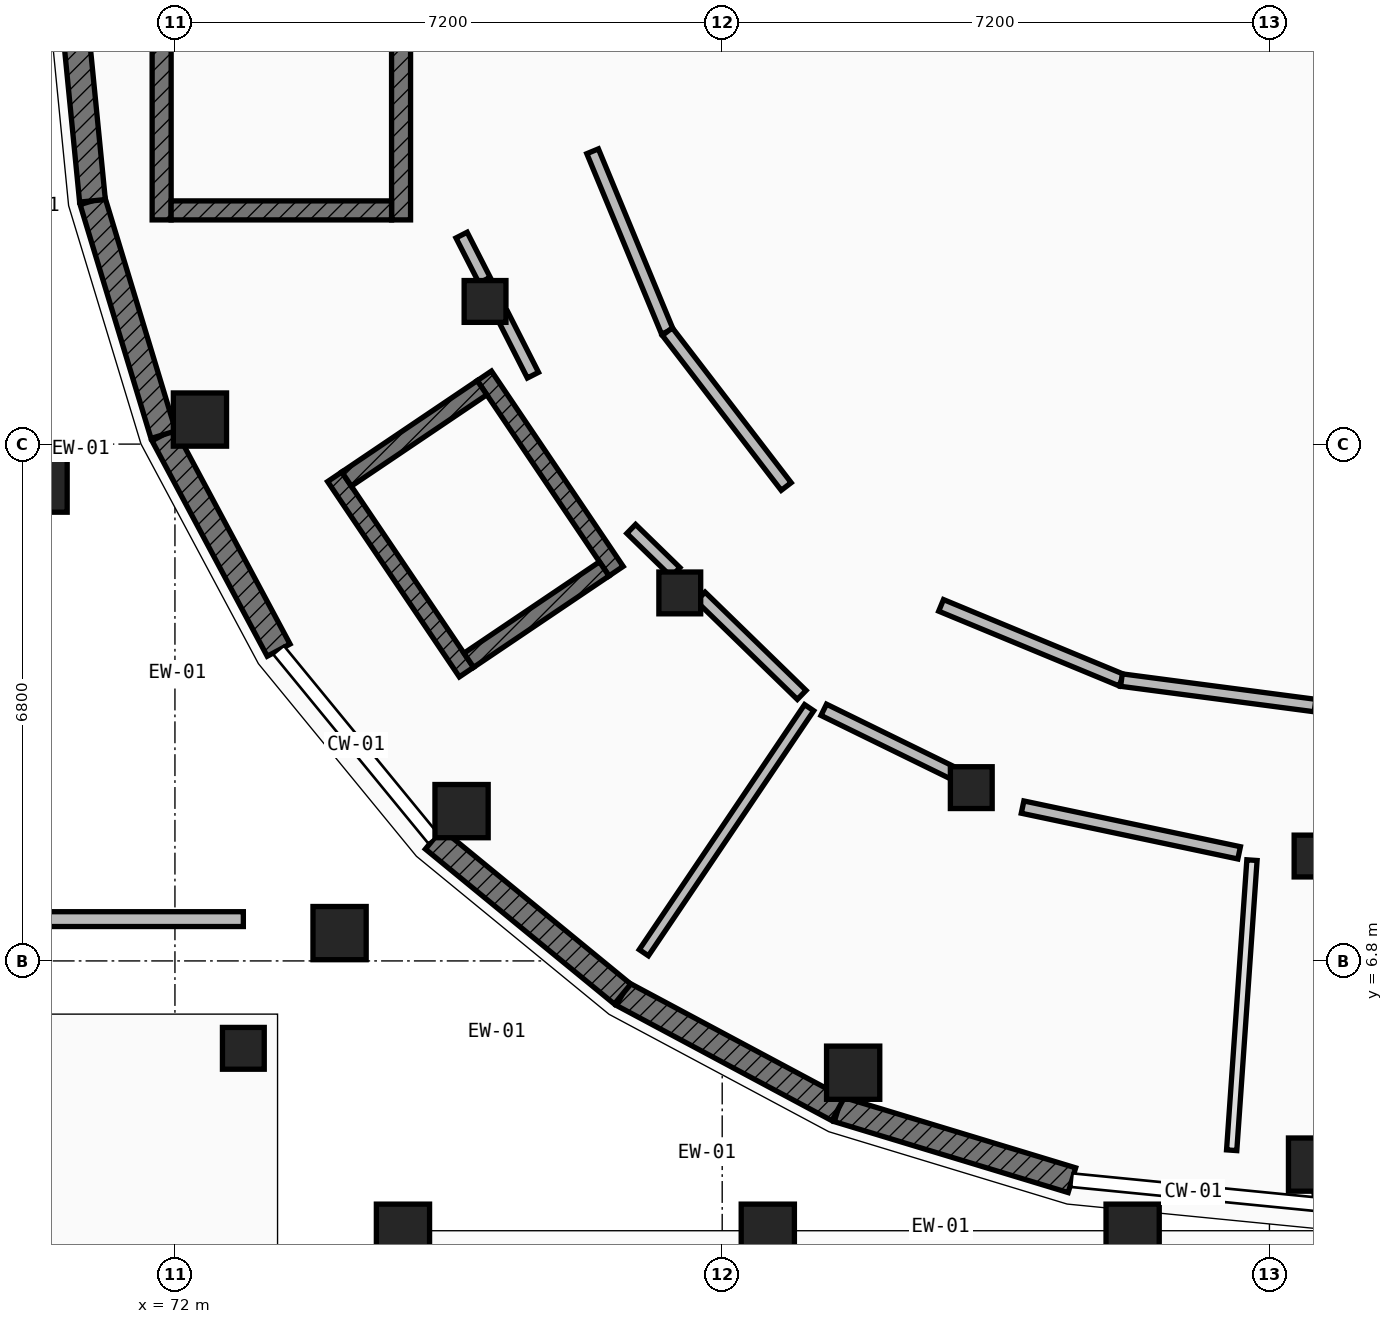
"""IFC4 building model, lengths in metres.
Left out: names, types, materials, properties, quantities, classifications, styles, units other than length and angle.
Written with IfcOpenShell. Run it as: python <this file> out.ifc"""

import sys

from ifc_helpers import new_model, si_unit, direction, frame, frame_2d, origin, origin_2d, place, context, subcontext, project, spatial, rectangle, circle, extrude, element, fill, save


model = new_model("IFC4")
c1 = context("Model", 3, precision=1e-05, world=origin(), true_north=direction((0.0, 1.0)))
c2 = subcontext(c1, "Body", "Model", "MODEL_VIEW")
j1 = project(units=[si_unit("LENGTHUNIT", "METRE"), si_unit("PLANEANGLEUNIT", "RADIAN")], contexts=[c1])
p1 = place(None, origin())
s1 = spatial("IfcSite", under=j1, at=p1, CompositionType="ELEMENT")
p2 = place(p1, origin())
s2 = spatial("IfcBuilding", under=s1, at=p2, CompositionType="ELEMENT")
p3 = place(p2, origin())
s3 = spatial("IfcBuildingStorey", under=s2, at=p3, CompositionType="ELEMENT", Elevation=0.0)
for number, where, z_axis, x_axis in (
    (1, (72.329, 13.923, 0.0), (0.0, 0.0, 1.0), (1.0, 0.0, 0.0)),
    (2, (75.771, 8.771, 0.0), (0.0, 0.0, 1.0), (1.0, 0.0, 0.0)),
    (3, (80.923, 5.329, 0.0), (0.0, 0.0, 1.0), (1.0, 0.0, 0.0)),
    (4, (87.0, 4.12, 0.0), (0.0, 0.0, 1.0), (1.0, 0.0, 0.0)),
):
    element("IfcColumn", number, at=place(p3, frame(where, z_axis=z_axis, x_axis=x_axis)), inside=s3, PredefinedType="COLUMN", context=c2, shape_type="SweptSolid", body=[
        extrude(circle(Radius=0.35, at=origin_2d()), origin(), (0.0, 0.0, 1.0), 4.55),
    ])
for number, where, z_axis, x_axis in (
    (5, (76.08, 15.477, 0.0), (0.0, 0.0, 1.0), (1.0, 0.0, 0.0)),
    (6, (78.642, 11.642, 0.0), (0.0, 0.0, 1.0), (1.0, 0.0, 0.0)),
    (7, (82.477, 9.08, 0.0), (0.0, 0.0, 1.0), (1.0, 0.0, 0.0)),
    (8, (87.0, 8.18, 0.0), (0.0, 0.0, 1.0), (1.0, 0.0, 0.0)),
):
    element("IfcColumn", number, at=place(p3, frame(where, z_axis=z_axis, x_axis=x_axis)), inside=s3, PredefinedType="COLUMN", context=c2, shape_type="SweptSolid", body=[
        extrude(rectangle(XDim=0.55, YDim=0.55, at=origin_2d()), origin(), (0.0, 0.0, 1.0), 4.55),
    ])
for number, where, z_axis, x_axis in (
    (9, (75.0, 3.25, 0.0), (0.0, 0.0, 1.0), (1.0, 0.0, 0.0)),
    (10, (79.8, 3.25, 0.0), (0.0, 0.0, 1.0), (1.0, 0.0, 0.0)),
    (11, (84.6, 3.25, 0.0), (0.0, 0.0, 1.0), (1.0, 0.0, 0.0)),
):
    element("IfcColumn", number, at=place(p3, frame(where, z_axis=z_axis, x_axis=x_axis)), inside=s3, PredefinedType="COLUMN", context=c2, shape_type="SweptSolid", body=[
        extrude(circle(Radius=0.35, at=origin_2d()), origin(), (0.0, 0.0, 1.0), 4.55),
    ])
p4 = place(p3, frame((72.9, 5.65, 0.0), z_axis=(0.0, 0.0, 1.0), x_axis=(1.0, 0.0, 0.0)))
e12 = element("IfcColumn", 12, at=p4, inside=s3, PredefinedType="PILASTER", context=c2, shape_type="SweptSolid", body=[
    extrude(circle(Radius=0.275, at=origin_2d()), origin(), (0.0, 0.0, 1.0), 4.55),
])
for number, where, z_axis, x_axis in (
    (13, (70.232, 13.054, 0.0), (0.0, 0.0, 1.0), (1.0, 0.0, 0.0)),
    (14, (74.166, 7.166, 0.0), (0.0, 0.0, 1.0), (1.0, 0.0, 0.0)),
):
    element("IfcColumn", number, at=place(p3, frame(where, z_axis=z_axis, x_axis=x_axis)), inside=s3, PredefinedType="COLUMN", context=c2, shape_type="SweptSolid", body=[
        extrude(circle(Radius=0.35, at=origin_2d()), origin(), (0.0, 0.0, 1.0), 4.55),
    ])
p5 = place(p3, frame((83.801, 3.915, 0.0), z_axis=(0.0, 0.0, 1.0), x_axis=(-0.956984161567, 0.29014016356, 0.0)))
e15 = element("IfcWall", 15, at=p5, inside=s3, PredefinedType="SOLIDWALL", context=c2, shape_type="SweptSolid", body=[
    extrude(rectangle(XDim=3.215, YDim=0.34, at=frame_2d((1.607, 0.0))), origin(), (0.0, 0.0, 1.0), 3.659),
])
p6 = place(p5, frame((0.708, 0.0, 0.0)))
e16 = element("IfcOpeningElement", 16, at=p6, cuts=e15, PredefinedType="OPENING", context=c2, shape_type="SweptSolid", body=[
    extrude(rectangle(XDim=1.8, YDim=2.55, at=frame_2d((0.9, 1.275))), frame((0.0, 0.18, 0.0), z_axis=(0.0, -1.0, 0.0), x_axis=(1.0, 0.0, 0.0)), (0.0, 0.0, 1.0), 0.36),
])
for number, where, z_axis, x_axis in (
    (17, (80.724, 4.848, 0.0), (0.0, 0.0, 1.0), (-0.882, 0.472, 0.0)),
    (18, (77.889, 6.364, 0.0), (0.0, 0.0, 1.0), (-0.773, 0.634, 0.0)),
    (19, (73.364, 10.889, 0.0), (0.0, 0.0, 1.0), (-0.472, 0.882, 0.0)),
    (20, (71.848, 13.724, 0.0), (0.0, 0.0, 1.0), (-0.29, 0.957, 0.0)),
):
    element("IfcWall", number, at=place(p3, frame(where, z_axis=z_axis, x_axis=x_axis)), inside=s3, PredefinedType="SOLIDWALL", context=c2, shape_type="SweptSolid", body=[
        extrude(rectangle(XDim=3.215, YDim=0.34, at=frame_2d((1.607, 0.0))), origin(), (0.0, 0.0, 1.0), 3.659),
    ])
p7 = place(p3, frame((70.915, 16.801, 0.0), z_axis=(0.0, 0.0, 1.0), x_axis=(-0.097977057849, 0.995188673637, 0.0)))
e21 = element("IfcWall", 21, at=p7, inside=s3, PredefinedType="SOLIDWALL", context=c2, shape_type="SweptSolid", body=[
    extrude(rectangle(XDim=3.214, YDim=0.34, at=frame_2d((1.607, 0.0))), origin(), (0.0, 0.0, 1.0), 3.659),
])
p8 = place(p3, frame((72.9, 7.35, 0.0), z_axis=(0.0, 0.0, 1.0), x_axis=(-1.0, 0.0, 0.0)))
e22 = element("IfcWall", 22, at=p8, inside=s3, PredefinedType="PARAPET", context=c2, shape_type="SweptSolid", body=[
    extrude(rectangle(XDim=14.398, YDim=0.195, at=frame_2d((7.199, 0.0))), origin(), (0.0, 0.0, 1.0), 2.42),
])
p9 = place(p8, frame((6.424, 0.0, 0.0)))
e23 = element("IfcOpeningElement", 23, at=p9, cuts=e22, PredefinedType="OPENING", context=c2, shape_type="SweptSolid", body=[
    extrude(rectangle(XDim=1.55, YDim=2.1, at=frame_2d((0.775, 1.05))), frame((0.0, 0.107, 0.0), z_axis=(0.0, -1.0, 0.0), x_axis=(1.0, 0.0, 0.0)), (0.0, 0.0, 1.0), 0.215),
])
p10 = place(p3, frame((74.975, 16.55, 0.0), z_axis=(0.0, 0.0, 1.0), x_axis=(0.0, 1.0, 0.0)))
e24 = element("IfcWall", 24, at=p10, inside=s3, PredefinedType="SHEAR", context=c2, shape_type="SweptSolid", body=[
    extrude(rectangle(XDim=6.9, YDim=0.25, at=frame_2d((3.45, 0.0))), origin(), (0.0, 0.0, 1.0), 4.305),
])
p11 = place(p10, frame((0.43, 0.0, 0.0)))
e25 = element("IfcOpeningElement", 25, at=p11, cuts=e24, PredefinedType="OPENING", context=c2, shape_type="SweptSolid", body=[
    extrude(rectangle(XDim=1.1, YDim=2.15, at=frame_2d((0.55, 1.075))), frame((0.0, 0.135, 0.0), z_axis=(0.0, -1.0, 0.0), x_axis=(1.0, 0.0, 0.0)), (0.0, 0.0, 1.0), 0.27),
])
p12 = place(p3, frame((71.825, 16.55, 0.0), z_axis=(0.0, 0.0, 1.0), x_axis=(0.0, 1.0, 0.0)))
e26 = element("IfcWall", 26, at=p12, inside=s3, PredefinedType="SHEAR", context=c2, shape_type="SweptSolid", body=[
    extrude(rectangle(XDim=6.9, YDim=0.25, at=frame_2d((3.45, 0.0))), origin(), (0.0, 0.0, 1.0), 4.305),
])
p13 = place(p3, frame((74.85, 16.675, 0.0), z_axis=(0.0, 0.0, 1.0), x_axis=(-1.0, 0.0, 0.0)))
e27 = element("IfcWall", 27, at=p13, inside=s3, PredefinedType="SHEAR", context=c2, shape_type="SweptSolid", body=[
    extrude(rectangle(XDim=2.9, YDim=0.25, at=frame_2d((1.45, 0.0))), origin(), (0.0, 0.0, 1.0), 4.305),
])
p14 = place(p3, frame((77.804, 11.928, 0.0), z_axis=(0.0, 0.0, 1.0), x_axis=(-0.559054792443, 0.829130712883, 0.0)))
e28 = element("IfcWall", 28, at=p14, inside=s3, PredefinedType="SHEAR", context=c2, shape_type="SweptSolid", body=[
    extrude(rectangle(XDim=3.1, YDim=0.225, at=frame_2d((1.55, 0.0))), origin(), (0.0, 0.0, 1.0), 4.305),
])
p15 = place(p14, frame((0.9, 0.0, 0.0)))
e29 = element("IfcOpeningElement", 29, at=p15, cuts=e28, PredefinedType="OPENING", context=c2, shape_type="SweptSolid", body=[
    extrude(rectangle(XDim=1.3, YDim=2.2, at=frame_2d((0.65, 1.1))), frame((0.0, 0.123, 0.0), z_axis=(0.0, -1.0, 0.0), x_axis=(1.0, 0.0, 0.0)), (0.0, 0.0, 1.0), 0.245),
])
p16 = place(p3, frame((75.835, 10.6, 0.0), z_axis=(0.0, 0.0, 1.0), x_axis=(-0.559091302934, 0.829106093925, 0.0)))
e30 = element("IfcWall", 30, at=p16, inside=s3, PredefinedType="SHEAR", context=c2, shape_type="SweptSolid", body=[
    extrude(rectangle(XDim=3.1, YDim=0.225, at=frame_2d((1.55, 0.0))), origin(), (0.0, 0.0, 1.0), 4.305),
])
p17 = place(p3, frame((77.648, 11.958, 0.0), z_axis=(0.0, 0.0, 1.0), x_axis=(-0.829050086962, -0.559174349652, 0.0)))
e31 = element("IfcWall", 31, at=p17, inside=s3, PredefinedType="SHEAR", context=c2, shape_type="SweptSolid", body=[
    extrude(rectangle(XDim=2.149, YDim=0.225, at=frame_2d((1.075, 0.0))), origin(), (0.0, 0.0, 1.0), 4.305),
])
p18 = place(p3, frame((76.04, 14.342, 0.0), z_axis=(0.0, 0.0, 1.0), x_axis=(-0.828997430928, -0.559252411274, 0.0)))
e32 = element("IfcWall", 32, at=p18, inside=s3, PredefinedType="SHEAR", context=c2, shape_type="SweptSolid", body=[
    extrude(rectangle(XDim=2.15, YDim=0.225, at=frame_2d((1.075, 0.0))), origin(), (0.0, 0.0, 1.0), 4.305),
])
p19 = place(p3, frame((77.495, 17.453, 0.0), z_axis=(0.0, 0.0, 1.0), x_axis=(0.382704397106, -0.923870848353, 0.0)))
e33 = element("IfcWall", 33, at=p19, inside=s3, PredefinedType="PARTITIONING", context=c2, shape_type="SweptSolid", body=[
    extrude(rectangle(XDim=2.568, YDim=0.165, at=frame_2d((1.284, 0.0))), origin(), (0.0, 0.0, 1.0), 3.634),
])
p20 = place(p19, frame((0.459, 0.0, 0.0)))
e34 = element("IfcOpeningElement", 34, at=p20, cuts=e33, PredefinedType="OPENING", context=c2, shape_type="SweptSolid", body=[
    extrude(rectangle(XDim=1.65, YDim=2.4, at=frame_2d((0.825, 1.2))), frame((0.0, 0.093, 0.0), z_axis=(0.0, -1.0, 0.0), x_axis=(1.0, 0.0, 0.0)), (0.0, 0.0, 1.0), 0.185),
])
p21 = place(p3, frame((78.478, 15.08, 0.0), z_axis=(0.0, 0.0, 1.0), x_axis=(0.608782621434, -0.793337078322, 0.0)))
e35 = element("IfcWall", 35, at=p21, inside=s3, PredefinedType="PARTITIONING", context=c2, shape_type="SweptSolid", body=[
    extrude(rectangle(XDim=2.569, YDim=0.165, at=frame_2d((1.285, 0.0))), origin(), (0.0, 0.0, 1.0), 3.634),
])
p22 = place(p3, frame((82.08, 11.478, 0.0), z_axis=(0.0, 0.0, 1.0), x_axis=(0.923870848353, -0.382704397106, 0.0)))
e36 = element("IfcWall", 36, at=p22, inside=s3, PredefinedType="PARTITIONING", context=c2, shape_type="SweptSolid", body=[
    extrude(rectangle(XDim=2.568, YDim=0.165, at=frame_2d((1.284, 0.0))), origin(), (0.0, 0.0, 1.0), 3.634),
])
p23 = place(p3, frame((84.453, 10.495, 0.0), z_axis=(0.0, 0.0, 1.0), x_axis=(0.991451384224, -0.130476636685, 0.0)))
e37 = element("IfcWall", 37, at=p23, inside=s3, PredefinedType="PARTITIONING", context=c2, shape_type="SweptSolid", body=[
    extrude(rectangle(XDim=2.569, YDim=0.165, at=frame_2d((1.285, 0.0))), origin(), (0.0, 0.0, 1.0), 3.634),
])
p24 = place(p3, frame((80.344, 10.132, 0.0), z_axis=(0.0, 0.0, 1.0), x_axis=(-0.559255053263, -0.828995648601, 0.0)))
e38 = element("IfcWall", 38, at=p24, inside=s3, PredefinedType="PARTITIONING", context=c2, shape_type="SweptSolid", body=[
    extrude(rectangle(XDim=3.889, YDim=0.145, at=frame_2d((1.945, 0.0))), origin(), (0.0, 0.0, 1.0), 3.634),
])
p25 = place(p3, frame((86.17, 8.126, 0.0), z_axis=(0.0, 0.0, 1.0), x_axis=(-0.069741502562, -0.997565097034, 0.0)))
e39 = element("IfcWall", 39, at=p25, inside=s3, PredefinedType="PLUMBINGWALL", context=c2, shape_type="SweptSolid", body=[
    extrude(rectangle(XDim=3.826, YDim=0.135, at=frame_2d((1.913, 0.0))), origin(), (0.0, 0.0, 1.0), 3.634),
])
p26 = place(p3, frame((75.771, 16.35, 0.0), z_axis=(0.0, 0.0, 1.0), x_axis=(0.454968944113, -0.890507304795, 0.0)))
e40 = element("IfcWall", 40, at=p26, inside=s3, PredefinedType="PARTITIONING", context=c2, shape_type="SweptSolid", body=[
    extrude(rectangle(XDim=0.666, YDim=0.165, at=frame_2d((0.333, 0.0))), origin(), (0.0, 0.0, 1.0), 3.634),
])
p27 = place(p3, frame((76.303, 15.308, 0.0), z_axis=(0.0, 0.0, 1.0), x_axis=(0.452964881354, -0.891528359762, 0.0)))
e41 = element("IfcWall", 41, at=p27, inside=s3, PredefinedType="PARTITIONING", context=c2, shape_type="SweptSolid", body=[
    extrude(rectangle(XDim=0.898, YDim=0.165, at=frame_2d((0.449, 0.0))), origin(), (0.0, 0.0, 1.0), 3.634),
])
p28 = place(p3, frame((78.003, 12.484, 0.0), z_axis=(0.0, 0.0, 1.0), x_axis=(0.716344915194, -0.697746345369, 0.0)))
e42 = element("IfcWall", 42, at=p28, inside=s3, PredefinedType="PARTITIONING", context=c2, shape_type="SweptSolid", body=[
    extrude(rectangle(XDim=0.814, YDim=0.165, at=frame_2d((0.407, 0.0))), origin(), (0.0, 0.0, 1.0), 3.634),
])
p29 = place(p3, frame((78.917, 11.593, 0.0), z_axis=(0.0, 0.0, 1.0), x_axis=(0.716782843261, -0.697296461777, 0.0)))
e43 = element("IfcWall", 43, at=p29, inside=s3, PredefinedType="PARTITIONING", context=c2, shape_type="SweptSolid", body=[
    extrude(rectangle(XDim=1.854, YDim=0.165, at=frame_2d((0.927, 0.0))), origin(), (0.0, 0.0, 1.0), 3.634),
])
p30 = place(p29, frame((0.347, 0.0, 0.0)))
e44 = element("IfcOpeningElement", 44, at=p30, cuts=e43, PredefinedType="OPENING", context=c2, shape_type="SweptSolid", body=[
    extrude(rectangle(XDim=1.16, YDim=2.18, at=frame_2d((0.58, 1.09))), frame((0.0, 0.093, 0.0), z_axis=(0.0, -1.0, 0.0), x_axis=(1.0, 0.0, 0.0)), (0.0, 0.0, 1.0), 0.185),
])
p31 = place(p3, frame((80.536, 10.104, 0.0), z_axis=(0.0, 0.0, 1.0), x_axis=(0.898155885725, -0.4396771599, 0.0)))
e45 = element("IfcWall", 45, at=p31, inside=s3, PredefinedType="PARTITIONING", context=c2, shape_type="SweptSolid", body=[
    extrude(rectangle(XDim=1.922, YDim=0.165, at=frame_2d((0.961, 0.0))), origin(), (0.0, 0.0, 1.0), 3.634),
])
p32 = place(p31, frame((0.351, 0.0, 0.0)))
e46 = element("IfcOpeningElement", 46, at=p32, cuts=e45, PredefinedType="OPENING", context=c2, shape_type="SweptSolid", body=[
    extrude(rectangle(XDim=1.22, YDim=2.18, at=frame_2d((0.61, 1.09))), frame((0.0, 0.093, 0.0), z_axis=(0.0, -1.0, 0.0), x_axis=(1.0, 0.0, 0.0)), (0.0, 0.0, 1.0), 0.185),
])
p33 = place(p3, frame((83.152, 8.824, 0.0), z_axis=(0.0, 0.0, 1.0), x_axis=(0.978391146113, -0.206762581739, 0.0)))
e47 = element("IfcWall", 47, at=p33, inside=s3, PredefinedType="PARTITIONING", context=c2, shape_type="SweptSolid", body=[
    extrude(rectangle(XDim=2.912, YDim=0.165, at=frame_2d((1.456, 0.0))), origin(), (0.0, 0.0, 1.0), 3.634),
])
p34 = place(p6, origin())
e48 = element("IfcDoor", 48, at=p34, inside=s3, OperationType="SINGLE_SWING_LEFT", PredefinedType="DOOR", context=c2, shape_type="SweptSolid", body=[
    extrude(rectangle(XDim=1.8, YDim=2.55, at=frame_2d((0.9, 1.275))), frame((0.0, 0.025, 0.0), z_axis=(0.0, -1.0, 0.0), x_axis=(1.0, 0.0, 0.0)), (0.0, 0.0, 1.0), 0.05),
])
fill(e16, e48)
p35 = place(p11, origin())
e49 = element("IfcDoor", 49, at=p35, inside=s3, OperationType="SINGLE_SWING_RIGHT", PredefinedType="DOOR", context=c2, shape_type="SweptSolid", body=[
    extrude(rectangle(XDim=1.1, YDim=2.15, at=frame_2d((0.55, 1.075))), frame((0.0, 0.025, 0.0), z_axis=(0.0, -1.0, 0.0), x_axis=(1.0, 0.0, 0.0)), (0.0, 0.0, 1.0), 0.05),
])
fill(e25, e49)
p36 = place(p15, origin())
e50 = element("IfcDoor", 50, at=p36, inside=s3, OperationType="DOUBLE_DOOR_SLIDING", PredefinedType="DOOR", context=c2, shape_type="SweptSolid", body=[
    extrude(rectangle(XDim=1.3, YDim=2.2, at=frame_2d((0.65, 1.1))), frame((0.0, 0.025, 0.0), z_axis=(0.0, -1.0, 0.0), x_axis=(1.0, 0.0, 0.0)), (0.0, 0.0, 1.0), 0.05),
])
fill(e29, e50)
p37 = place(p20, origin())
e51 = element("IfcDoor", 51, at=p37, inside=s3, OperationType="SINGLE_SWING_RIGHT", PredefinedType="DOOR", context=c2, shape_type="SweptSolid", body=[
    extrude(rectangle(XDim=1.65, YDim=2.4, at=frame_2d((0.825, 1.2))), frame((0.0, 0.025, 0.0), z_axis=(0.0, -1.0, 0.0), x_axis=(1.0, 0.0, 0.0)), (0.0, 0.0, 1.0), 0.05),
])
fill(e34, e51)
p38 = place(p30, origin())
e52 = element("IfcDoor", 52, at=p38, inside=s3, OperationType="SINGLE_SWING_RIGHT", PredefinedType="DOOR", context=c2, shape_type="SweptSolid", body=[
    extrude(rectangle(XDim=1.16, YDim=2.18, at=frame_2d((0.58, 1.09))), frame((0.0, 0.025, 0.0), z_axis=(0.0, -1.0, 0.0), x_axis=(1.0, 0.0, 0.0)), (0.0, 0.0, 1.0), 0.05),
])
fill(e44, e52)
p39 = place(p32, origin())
e53 = element("IfcDoor", 53, at=p39, inside=s3, OperationType="SINGLE_SWING_LEFT", PredefinedType="DOOR", context=c2, shape_type="SweptSolid", body=[
    extrude(rectangle(XDim=1.22, YDim=2.18, at=frame_2d((0.61, 1.09))), frame((0.0, 0.025, 0.0), z_axis=(0.0, -1.0, 0.0), x_axis=(1.0, 0.0, 0.0)), (0.0, 0.0, 1.0), 0.05),
])
fill(e46, e53)
save(model, sys.argv[1])
